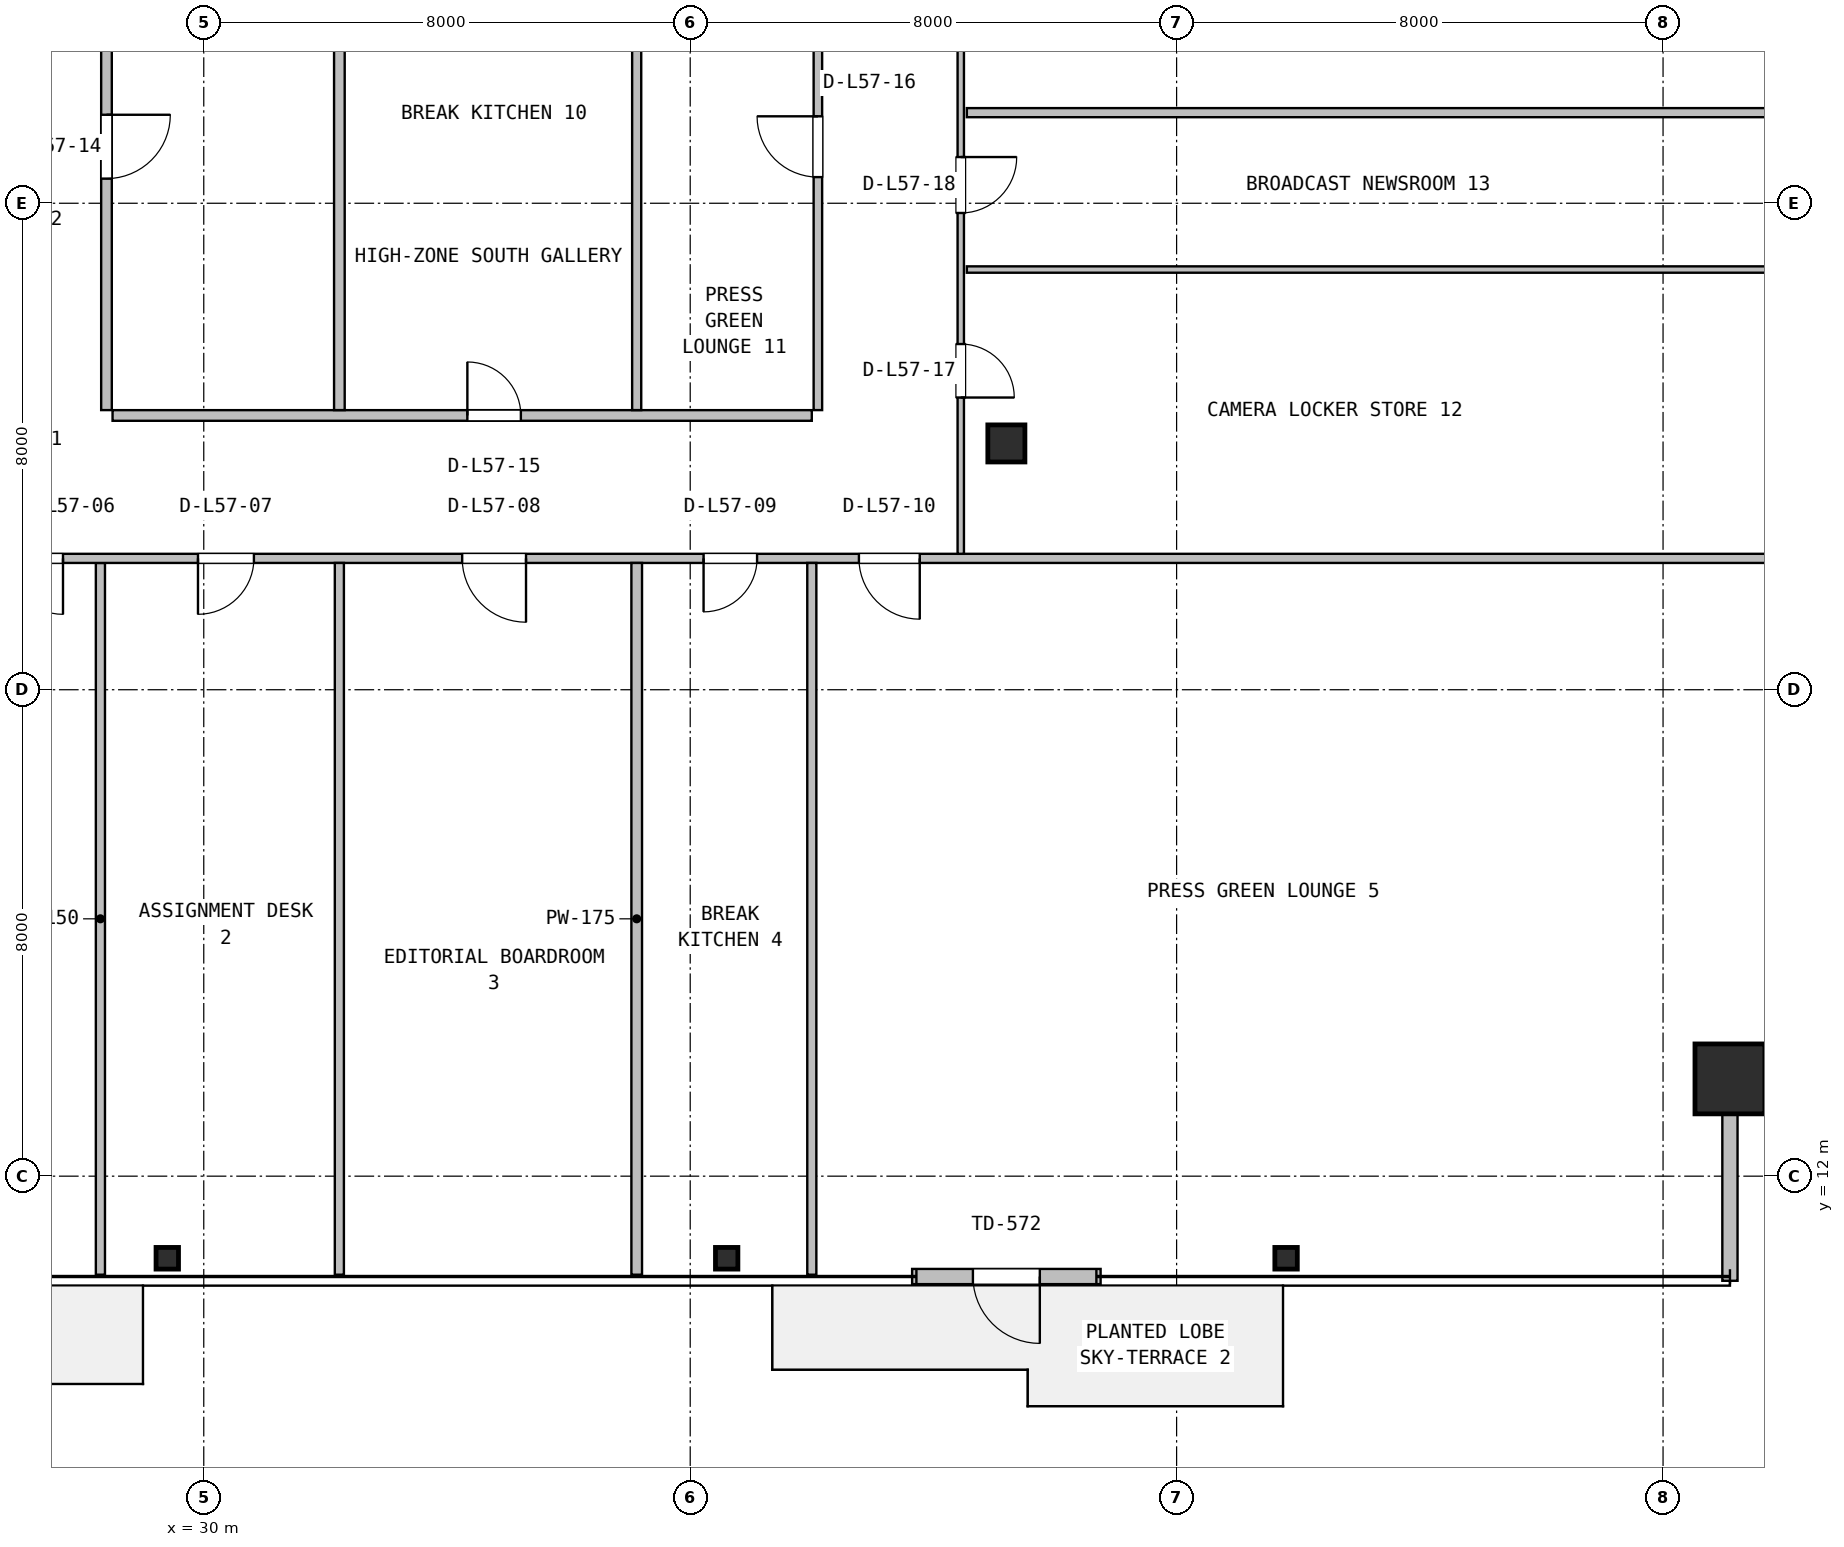
"""IFC4 building model, lengths in metres.
Left out: names, types, materials, properties, quantities, classifications, styles, units other than length and angle.
Written with IfcOpenShell. Run it as: python <this file> out.ifc"""

import sys

from ifc_helpers import new_model, si_unit, direction, frame, frame_2d, origin, origin_2d, place, context, subcontext, project, spatial, rectangle, hollow_rectangle, hollow_circle, i_section, extrude, source, transform, mapped, element, fill, save


model = new_model("IFC4")
c1 = context("Model", 3, precision=1e-05, world=origin(), true_north=direction((0.0, 1.0)))
c2 = subcontext(c1, "Body", "Model", "MODEL_VIEW")
j1 = project(units=[si_unit("LENGTHUNIT", "METRE"), si_unit("PLANEANGLEUNIT", "RADIAN")], contexts=[c1])
p1 = place(None, origin())
s1 = spatial("IfcSite", under=j1, at=p1, CompositionType="ELEMENT")
p2 = place(p1, origin())
s2 = spatial("IfcBuilding", under=s1, at=p2, CompositionType="ELEMENT")
p3 = place(p2, frame((0.0, 0.0, 230.2)))
s3 = spatial("IfcBuildingStorey", under=s2, at=p3, CompositionType="ELEMENT", Elevation=230.2)
m1 = source(origin(), c2, "Body", "SweptSolid", [
    extrude(hollow_rectangle(XDim=1.15, YDim=1.15, WallThickness=0.045, at=origin_2d()), origin(), (0.0, 0.0, 1.0), 3.8),
])
p4 = place(p3, frame((55.1, 13.6, 0.0), z_axis=(0.0, 0.0, 1.0), x_axis=(1.0, 0.0, 0.0)))
e1 = element("IfcColumn", 1, at=p4, inside=s3, PredefinedType="COLUMN", context=c2, shape_type="MappedRepresentation", body=[
    mapped(m1, transform((0.0, 0.0, 0.0), x_axis=(1.0, 0.0, 0.0), y_axis=(0.0, 1.0, 0.0), z_axis=(0.0, 0.0, 1.0), scale=1.0)),
])
m2 = source(origin(), c2, "Body", "SweptSolid", [
    extrude(i_section(OverallWidth=0.369, OverallDepth=0.356, WebThickness=0.011, FlangeThickness=0.018, FilletRadius=0.016, at=origin_2d()), origin(), (0.0, 0.0, 1.0), 3.8),
])
for number, where, z_axis, x_axis in (
    (2, (29.4, 10.65, 0.0), (0.0, 0.0, 1.0), (1.0, 0.0, 0.0)),
    (3, (38.6, 10.65, 0.0), (0.0, 0.0, 1.0), (1.0, 0.0, 0.0)),
    (4, (47.8, 10.65, 0.0), (0.0, 0.0, 1.0), (1.0, 0.0, 0.0)),
):
    element("IfcColumn", number, at=place(p3, frame(where, z_axis=z_axis, x_axis=x_axis)), inside=s3, PredefinedType="COLUMN", context=c2, shape_type="MappedRepresentation", body=[
        mapped(m2, transform((0.0, 0.0, 0.0), x_axis=(1.0, 0.0, 0.0), y_axis=(0.0, 1.0, 0.0), z_axis=(0.0, 0.0, 1.0), scale=1.0)),
    ])
m3 = source(origin(), c2, "Body", "SweptSolid", [
    extrude(hollow_circle(Radius=0.305, WallThickness=0.025, at=origin_2d()), origin(), (0.0, 0.0, 1.0), 3.8),
])
p5 = place(p3, frame((43.2, 24.05, 0.0), z_axis=(0.0, 0.0, 1.0), x_axis=(1.0, 0.0, 0.0)))
e5 = element("IfcColumn", 5, at=p5, inside=s3, PredefinedType="COLUMN", context=c2, shape_type="MappedRepresentation", body=[
    mapped(m3, transform((0.0, 0.0, 0.0), x_axis=(1.0, 0.0, 0.0), y_axis=(0.0, 1.0, 0.0), z_axis=(0.0, 0.0, 1.0), scale=1.0)),
])
p6 = place(p3, frame((41.65, 10.35, 0.0), z_axis=(0.0, 0.0, 1.0), x_axis=(1.0, 0.0, 0.0)))
e6 = element("IfcWall", 6, at=p6, inside=s3, PredefinedType="SOLIDWALL", context=c2, shape_type="SweptSolid", body=[
    extrude(rectangle(XDim=3.1, YDim=0.25, at=frame_2d((1.55, 0.0))), origin(), (0.0, 0.0, 1.0), 3.46),
])
p7 = place(p6, frame((1.0, 0.0, 0.0)))
e7 = element("IfcOpeningElement", 7, at=p7, cuts=e6, PredefinedType="OPENING", context=c2, shape_type="SweptSolid", body=[
    extrude(rectangle(XDim=1.1, YDim=2.15, at=frame_2d((0.55, 1.075))), frame((0.0, 0.135, 0.0), z_axis=(0.0, -1.0, 0.0), x_axis=(1.0, 0.0, 0.0)), (0.0, 0.0, 1.0), 0.27),
])
p8 = place(p3, frame((55.1, 10.28, 0.0), z_axis=(0.0, 0.0, 1.0), x_axis=(0.0, 1.0, 0.0)))
e8 = element("IfcWall", 8, at=p8, inside=s3, PredefinedType="SOLIDWALL", context=c2, shape_type="SweptSolid", body=[
    extrude(rectangle(XDim=3.4, YDim=0.25, at=frame_2d((1.7, 0.0))), origin(), (0.0, 0.0, 1.0), 3.101),
])
p9 = place(p3, frame((28.3, 10.38, 0.0), z_axis=(0.0, 0.0, 1.0), x_axis=(0.0, 1.0, 0.0)))
e9 = element("IfcWall", 9, at=p9, inside=s3, PredefinedType="PARTITIONING", context=c2, shape_type="SweptSolid", body=[
    extrude(rectangle(XDim=11.705, YDim=0.15, at=frame_2d((5.853, 0.0))), origin(), (0.0, 0.0, 1.0), 2.682),
])
p10 = place(p3, frame((9.68, 22.16, 0.0), z_axis=(0.0, 0.0, 1.0), x_axis=(1.0, 0.0, 0.0)))
e10 = element("IfcWall", 10, at=p10, inside=s3, PredefinedType="PARTITIONING", context=c2, shape_type="SweptSolid", body=[
    extrude(rectangle(XDim=48.64, YDim=0.15, at=frame_2d((24.32, 0.0))), origin(), (0.0, 0.0, 1.0), 2.838),
])
p11 = place(p10, frame((17.085, 0.0, 0.0)))
e11 = element("IfcOpeningElement", 11, at=p11, cuts=e10, PredefinedType="OPENING", context=c2, shape_type="SweptSolid", body=[
    extrude(rectangle(XDim=0.92, YDim=2.08, at=frame_2d((0.46, 1.04))), frame((0.0, 0.085, 0.0), z_axis=(0.0, -1.0, 0.0), x_axis=(1.0, 0.0, 0.0)), (0.0, 0.0, 1.0), 0.17),
])
p12 = place(p10, frame((20.225, 0.0, 0.0)))
e12 = element("IfcOpeningElement", 12, at=p12, cuts=e10, PredefinedType="OPENING", context=c2, shape_type="SweptSolid", body=[
    extrude(rectangle(XDim=0.92, YDim=2.08, at=frame_2d((0.46, 1.04))), frame((0.0, 0.085, 0.0), z_axis=(0.0, -1.0, 0.0), x_axis=(1.0, 0.0, 0.0)), (0.0, 0.0, 1.0), 0.17),
])
p13 = place(p10, frame((24.57, 0.0, 0.0)))
e13 = element("IfcOpeningElement", 13, at=p13, cuts=e10, PredefinedType="OPENING", context=c2, shape_type="SweptSolid", body=[
    extrude(rectangle(XDim=1.05, YDim=2.1, at=frame_2d((0.525, 1.05))), frame((0.0, 0.085, 0.0), z_axis=(0.0, -1.0, 0.0), x_axis=(1.0, 0.0, 0.0)), (0.0, 0.0, 1.0), 0.17),
])
p14 = place(p10, frame((28.54, 0.0, 0.0)))
e14 = element("IfcOpeningElement", 14, at=p14, cuts=e10, PredefinedType="OPENING", context=c2, shape_type="SweptSolid", body=[
    extrude(rectangle(XDim=0.88, YDim=2.06, at=frame_2d((0.44, 1.03))), frame((0.0, 0.085, 0.0), z_axis=(0.0, -1.0, 0.0), x_axis=(1.0, 0.0, 0.0)), (0.0, 0.0, 1.0), 0.17),
])
p15 = place(p10, frame((31.095, 0.0, 0.0)))
e15 = element("IfcOpeningElement", 15, at=p15, cuts=e10, PredefinedType="OPENING", context=c2, shape_type="SweptSolid", body=[
    extrude(rectangle(XDim=1.0, YDim=2.1, at=frame_2d((0.5, 1.05))), frame((0.0, 0.085, 0.0), z_axis=(0.0, -1.0, 0.0), x_axis=(1.0, 0.0, 0.0)), (0.0, 0.0, 1.0), 0.17),
])
p16 = place(p3, frame((32.23, 10.38, 0.0), z_axis=(0.0, 0.0, 1.0), x_axis=(0.0, 1.0, 0.0)))
e16 = element("IfcWall", 16, at=p16, inside=s3, PredefinedType="PARTITIONING", context=c2, shape_type="SweptSolid", body=[
    extrude(rectangle(XDim=11.705, YDim=0.15, at=frame_2d((5.853, 0.0))), origin(), (0.0, 0.0, 1.0), 2.682),
])
p17 = place(p3, frame((37.12, 10.38, 0.0), z_axis=(0.0, 0.0, 1.0), x_axis=(0.0, 1.0, 0.0)))
e17 = element("IfcWall", 17, at=p17, inside=s3, PredefinedType="PARTITIONING", context=c2, shape_type="SweptSolid", body=[
    extrude(rectangle(XDim=11.705, YDim=0.175, at=frame_2d((5.853, 0.0))), origin(), (0.0, 0.0, 1.0), 2.682),
])
p18 = place(p3, frame((40.0, 10.38, 0.0), z_axis=(0.0, 0.0, 1.0), x_axis=(0.0, 1.0, 0.0)))
e18 = element("IfcWall", 18, at=p18, inside=s3, PredefinedType="PARTITIONING", context=c2, shape_type="SweptSolid", body=[
    extrude(rectangle(XDim=11.705, YDim=0.15, at=frame_2d((5.853, 0.0))), origin(), (0.0, 0.0, 1.0), 2.682),
])
p19 = place(p3, frame((28.5, 24.51, 0.0), z_axis=(0.0, 0.0, 1.0), x_axis=(1.0, 0.0, 0.0)))
e19 = element("IfcWall", 19, at=p19, inside=s3, PredefinedType="PARTITIONING", context=c2, shape_type="SweptSolid", body=[
    extrude(rectangle(XDim=11.5, YDim=0.175, at=frame_2d((5.75, 0.0))), origin(), (0.0, 0.0, 1.0), 2.838),
])
p20 = place(p19, frame((5.835, 0.0, 0.0)))
e20 = element("IfcOpeningElement", 20, at=p20, cuts=e19, PredefinedType="OPENING", context=c2, shape_type="SweptSolid", body=[
    extrude(rectangle(XDim=0.88, YDim=2.06, at=frame_2d((0.44, 1.03))), frame((0.0, 0.098, 0.0), z_axis=(0.0, -1.0, 0.0), x_axis=(1.0, 0.0, 0.0)), (0.0, 0.0, 1.0), 0.195),
])
p21 = place(p3, frame((32.23, 24.598, 0.0), z_axis=(0.0, 0.0, 1.0), x_axis=(0.0, 1.0, 0.0)))
e21 = element("IfcWall", 21, at=p21, inside=s3, PredefinedType="PARTITIONING", context=c2, shape_type="SweptSolid", body=[
    extrude(rectangle(XDim=8.665, YDim=0.175, at=frame_2d((4.333, 0.0))), origin(), (0.0, 0.0, 1.0), 3.152),
])
p22 = place(p3, frame((28.4, 24.598, 0.0), z_axis=(0.0, 0.0, 1.0), x_axis=(0.0, 1.0, 0.0)))
e22 = element("IfcWall", 22, at=p22, inside=s3, PredefinedType="PARTITIONING", context=c2, shape_type="SweptSolid", body=[
    extrude(rectangle(XDim=8.665, YDim=0.175, at=frame_2d((4.333, 0.0))), origin(), (0.0, 0.0, 1.0), 3.152),
])
p23 = place(p22, frame((3.807, 0.0, 0.0)))
e23 = element("IfcOpeningElement", 23, at=p23, cuts=e22, PredefinedType="OPENING", context=c2, shape_type="SweptSolid", body=[
    extrude(rectangle(XDim=1.05, YDim=2.1, at=frame_2d((0.525, 1.05))), frame((0.0, 0.098, 0.0), z_axis=(0.0, -1.0, 0.0), x_axis=(1.0, 0.0, 0.0)), (0.0, 0.0, 1.0), 0.195),
])
p24 = place(p3, frame((37.12, 24.598, 0.0), z_axis=(0.0, 0.0, 1.0), x_axis=(0.0, 1.0, 0.0)))
e24 = element("IfcWall", 24, at=p24, inside=s3, PredefinedType="PARTITIONING", context=c2, shape_type="SweptSolid", body=[
    extrude(rectangle(XDim=8.665, YDim=0.15, at=frame_2d((4.333, 0.0))), origin(), (0.0, 0.0, 1.0), 3.152),
])
p25 = place(p3, frame((40.1, 24.598, 0.0), z_axis=(0.0, 0.0, 1.0), x_axis=(0.0, 1.0, 0.0)))
e25 = element("IfcWall", 25, at=p25, inside=s3, PredefinedType="PARTITIONING", context=c2, shape_type="SweptSolid", body=[
    extrude(rectangle(XDim=8.665, YDim=0.14, at=frame_2d((4.333, 0.0))), origin(), (0.0, 0.0, 1.0), 3.152),
])
p26 = place(p25, frame((3.832, 0.0, 0.0)))
e26 = element("IfcOpeningElement", 26, at=p26, cuts=e25, PredefinedType="OPENING", context=c2, shape_type="SweptSolid", body=[
    extrude(rectangle(XDim=1.0, YDim=2.1, at=frame_2d((0.5, 1.05))), frame((0.0, 0.08, 0.0), z_axis=(0.0, -1.0, 0.0), x_axis=(1.0, 0.0, 0.0)), (0.0, 0.0, 1.0), 0.16),
])
p27 = place(p3, frame((42.55, 26.91, 0.0), z_axis=(0.0, 0.0, 1.0), x_axis=(1.0, 0.0, 0.0)))
e27 = element("IfcWall", 27, at=p27, inside=s3, PredefinedType="PARTITIONING", context=c2, shape_type="SweptSolid", body=[
    extrude(rectangle(XDim=15.77, YDim=0.105, at=frame_2d((7.885, 0.0))), origin(), (0.0, 0.0, 1.0), 2.838),
])
p28 = place(p3, frame((42.45, 22.235, 0.0), z_axis=(0.0, 0.0, 1.0), x_axis=(0.0, 1.0, 0.0)))
e28 = element("IfcWall", 28, at=p28, inside=s3, PredefinedType="PARTITIONING", context=c2, shape_type="SweptSolid", body=[
    extrude(rectangle(XDim=11.04, YDim=0.105, at=frame_2d((5.52, 0.0))), origin(), (0.0, 0.0, 1.0), 2.838),
])
p29 = place(p28, frame((2.57, 0.0, 0.0)))
e29 = element("IfcOpeningElement", 29, at=p29, cuts=e28, PredefinedType="OPENING", context=c2, shape_type="SweptSolid", body=[
    extrude(rectangle(XDim=0.88, YDim=2.06, at=frame_2d((0.44, 1.03))), frame((0.0, 0.062, 0.0), z_axis=(0.0, -1.0, 0.0), x_axis=(1.0, 0.0, 0.0)), (0.0, 0.0, 1.0), 0.125),
])
p30 = place(p28, frame((5.605, 0.0, 0.0)))
e30 = element("IfcOpeningElement", 30, at=p30, cuts=e28, PredefinedType="OPENING", context=c2, shape_type="SweptSolid", body=[
    extrude(rectangle(XDim=0.92, YDim=2.08, at=frame_2d((0.46, 1.04))), frame((0.0, 0.062, 0.0), z_axis=(0.0, -1.0, 0.0), x_axis=(1.0, 0.0, 0.0)), (0.0, 0.0, 1.0), 0.125),
])
p31 = place(p3, frame((42.55, 29.49, 0.0), z_axis=(0.0, 0.0, 1.0), x_axis=(1.0, 0.0, 0.0)))
e31 = element("IfcWall", 31, at=p31, inside=s3, PredefinedType="PARTITIONING", context=c2, shape_type="SweptSolid", body=[
    extrude(rectangle(XDim=15.77, YDim=0.15, at=frame_2d((7.885, 0.0))), origin(), (0.0, 0.0, 1.0), 2.838),
])
m4 = source(origin(), c2, "Body", "SweptSolid", [
    extrude(rectangle(XDim=1.1, YDim=2.15, at=frame_2d((0.55, 1.075))), frame((0.0, 0.025, 0.0), z_axis=(0.0, -1.0, 0.0), x_axis=(1.0, 0.0, 0.0)), (0.0, 0.0, 1.0), 0.05),
])
p32 = place(p7, frame((1.1, 0.0, 0.0), z_axis=(0.0, 0.0, 1.0), x_axis=(-1.0, 0.0, 0.0)))
e32 = element("IfcDoor", 32, at=p32, inside=s3, OperationType="SINGLE_SWING_RIGHT", PredefinedType="DOOR", context=c2, shape_type="MappedRepresentation", body=[
    mapped(m4, transform((0.0, 0.0, 0.0), x_axis=(1.0, 0.0, 0.0), y_axis=(0.0, 1.0, 0.0), z_axis=(0.0, 0.0, 1.0), scale=1.0)),
])
fill(e7, e32)
m5 = source(origin(), c2, "Body", "SweptSolid", [
    extrude(rectangle(XDim=0.92, YDim=2.08, at=frame_2d((0.46, 1.04))), frame((0.0, 0.025, 0.0), z_axis=(0.0, -1.0, 0.0), x_axis=(1.0, 0.0, 0.0)), (0.0, 0.0, 1.0), 0.05),
])
p33 = place(p11, frame((0.92, 0.0, 0.0), z_axis=(0.0, 0.0, 1.0), x_axis=(-1.0, 0.0, 0.0)))
e33 = element("IfcDoor", 33, at=p33, inside=s3, OperationType="SINGLE_SWING_RIGHT", PredefinedType="DOOR", context=c2, shape_type="MappedRepresentation", body=[
    mapped(m5, transform((0.0, 0.0, 0.0), x_axis=(1.0, 0.0, 0.0), y_axis=(0.0, 1.0, 0.0), z_axis=(0.0, 0.0, 1.0), scale=1.0)),
])
fill(e11, e33)
p34 = place(p12, frame((0.92, 0.0, 0.0), z_axis=(0.0, 0.0, 1.0), x_axis=(-1.0, 0.0, 0.0)))
e34 = element("IfcDoor", 34, at=p34, inside=s3, OperationType="SINGLE_SWING_LEFT", PredefinedType="DOOR", context=c2, shape_type="MappedRepresentation", body=[
    mapped(m5, transform((0.0, 0.0, 0.0), x_axis=(1.0, 0.0, 0.0), y_axis=(0.0, 1.0, 0.0), z_axis=(0.0, 0.0, 1.0), scale=1.0)),
])
fill(e12, e34)
m6 = source(origin(), c2, "Body", "SweptSolid", [
    extrude(rectangle(XDim=1.05, YDim=2.1, at=frame_2d((0.525, 1.05))), frame((0.0, 0.025, 0.0), z_axis=(0.0, -1.0, 0.0), x_axis=(1.0, 0.0, 0.0)), (0.0, 0.0, 1.0), 0.05),
])
p35 = place(p13, frame((1.05, 0.0, 0.0), z_axis=(0.0, 0.0, 1.0), x_axis=(-1.0, 0.0, 0.0)))
e35 = element("IfcDoor", 35, at=p35, inside=s3, OperationType="SINGLE_SWING_RIGHT", PredefinedType="DOOR", context=c2, shape_type="MappedRepresentation", body=[
    mapped(m6, transform((0.0, 0.0, 0.0), x_axis=(1.0, 0.0, 0.0), y_axis=(0.0, 1.0, 0.0), z_axis=(0.0, 0.0, 1.0), scale=1.0)),
])
fill(e13, e35)
m7 = source(origin(), c2, "Body", "SweptSolid", [
    extrude(rectangle(XDim=0.88, YDim=2.06, at=frame_2d((0.44, 1.03))), frame((0.0, 0.025, 0.0), z_axis=(0.0, -1.0, 0.0), x_axis=(1.0, 0.0, 0.0)), (0.0, 0.0, 1.0), 0.05),
])
p36 = place(p14, frame((0.88, 0.0, 0.0), z_axis=(0.0, 0.0, 1.0), x_axis=(-1.0, 0.0, 0.0)))
e36 = element("IfcDoor", 36, at=p36, inside=s3, OperationType="SINGLE_SWING_LEFT", PredefinedType="DOOR", context=c2, shape_type="MappedRepresentation", body=[
    mapped(m7, transform((0.0, 0.0, 0.0), x_axis=(1.0, 0.0, 0.0), y_axis=(0.0, 1.0, 0.0), z_axis=(0.0, 0.0, 1.0), scale=1.0)),
])
fill(e14, e36)
m8 = source(origin(), c2, "Body", "SweptSolid", [
    extrude(rectangle(XDim=1.0, YDim=2.1, at=frame_2d((0.5, 1.05))), frame((0.0, 0.025, 0.0), z_axis=(0.0, -1.0, 0.0), x_axis=(1.0, 0.0, 0.0)), (0.0, 0.0, 1.0), 0.05),
])
p37 = place(p15, frame((1.0, 0.0, 0.0), z_axis=(0.0, 0.0, 1.0), x_axis=(-1.0, 0.0, 0.0)))
e37 = element("IfcDoor", 37, at=p37, inside=s3, OperationType="SINGLE_SWING_RIGHT", PredefinedType="DOOR", context=c2, shape_type="MappedRepresentation", body=[
    mapped(m8, transform((0.0, 0.0, 0.0), x_axis=(1.0, 0.0, 0.0), y_axis=(0.0, 1.0, 0.0), z_axis=(0.0, 0.0, 1.0), scale=1.0)),
])
fill(e15, e37)
p38 = place(p23, frame((1.05, 0.0, 0.0), z_axis=(0.0, 0.0, 1.0), x_axis=(-1.0, 0.0, 0.0)))
e38 = element("IfcDoor", 38, at=p38, inside=s3, OperationType="SINGLE_SWING_RIGHT", PredefinedType="DOOR", context=c2, shape_type="MappedRepresentation", body=[
    mapped(m6, transform((0.0, 0.0, 0.0), x_axis=(1.0, 0.0, 0.0), y_axis=(0.0, 1.0, 0.0), z_axis=(0.0, 0.0, 1.0), scale=1.0)),
])
fill(e23, e38)
p39 = place(p20, origin())
e39 = element("IfcDoor", 39, at=p39, inside=s3, OperationType="SINGLE_SWING_LEFT", PredefinedType="DOOR", context=c2, shape_type="MappedRepresentation", body=[
    mapped(m7, transform((0.0, 0.0, 0.0), x_axis=(1.0, 0.0, 0.0), y_axis=(0.0, 1.0, 0.0), z_axis=(0.0, 0.0, 1.0), scale=1.0)),
])
fill(e20, e39)
p40 = place(p26, origin())
e40 = element("IfcDoor", 40, at=p40, inside=s3, OperationType="SINGLE_SWING_RIGHT", PredefinedType="DOOR", context=c2, shape_type="MappedRepresentation", body=[
    mapped(m8, transform((0.0, 0.0, 0.0), x_axis=(1.0, 0.0, 0.0), y_axis=(0.0, 1.0, 0.0), z_axis=(0.0, 0.0, 1.0), scale=1.0)),
])
fill(e26, e40)
p41 = place(p29, frame((0.88, 0.0, 0.0), z_axis=(0.0, 0.0, 1.0), x_axis=(-1.0, 0.0, 0.0)))
e41 = element("IfcDoor", 41, at=p41, inside=s3, OperationType="SINGLE_SWING_LEFT", PredefinedType="DOOR", context=c2, shape_type="MappedRepresentation", body=[
    mapped(m7, transform((0.0, 0.0, 0.0), x_axis=(1.0, 0.0, 0.0), y_axis=(0.0, 1.0, 0.0), z_axis=(0.0, 0.0, 1.0), scale=1.0)),
])
fill(e29, e41)
p42 = place(p30, frame((0.92, 0.0, 0.0), z_axis=(0.0, 0.0, 1.0), x_axis=(-1.0, 0.0, 0.0)))
e42 = element("IfcDoor", 42, at=p42, inside=s3, OperationType="SINGLE_SWING_RIGHT", PredefinedType="DOOR", context=c2, shape_type="MappedRepresentation", body=[
    mapped(m5, transform((0.0, 0.0, 0.0), x_axis=(1.0, 0.0, 0.0), y_axis=(0.0, 1.0, 0.0), z_axis=(0.0, 0.0, 1.0), scale=1.0)),
])
fill(e30, e42)
save(model, sys.argv[1])
